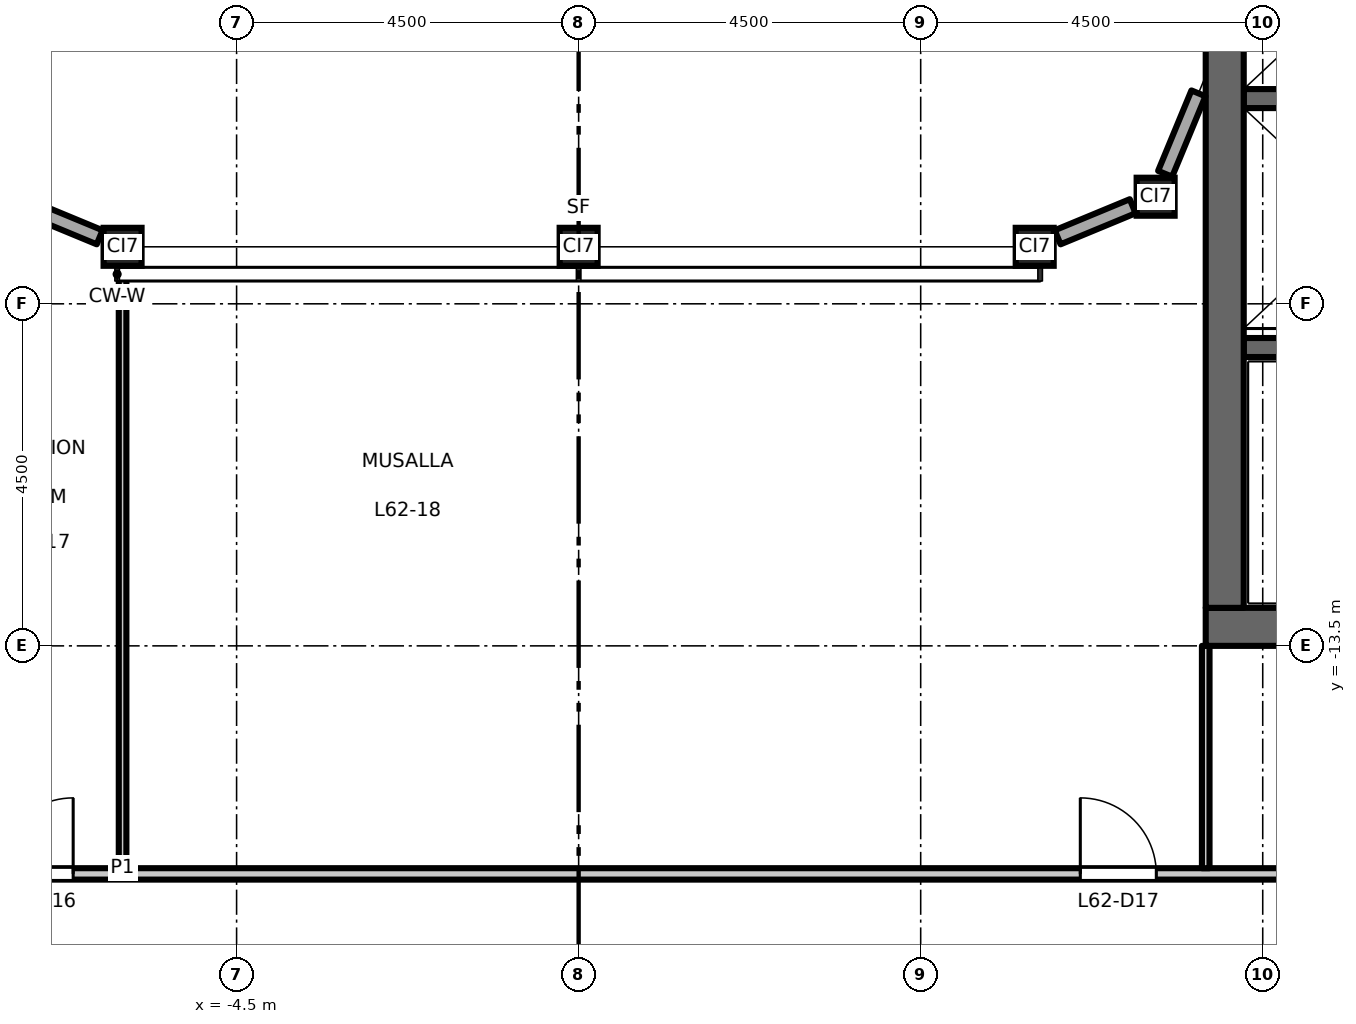
"""IFC4 building model, lengths in metres.
Left out: names, types, materials, properties, quantities, classifications, styles, units other than length and angle.
Written with IfcOpenShell. Run it as: python <this file> out.ifc"""

import sys

from ifc_helpers import new_model, si_unit, direction, frame, frame_2d, origin, origin_2d, place, context, subcontext, project, spatial, rectangle, hollow_rectangle, extrude, element, fill, save


model = new_model("IFC4")
c1 = context("Model", 3, precision=1e-05, world=origin(), true_north=direction((0.0, 1.0)))
c2 = subcontext(c1, "Body", "Model", "MODEL_VIEW")
j1 = project(units=[si_unit("LENGTHUNIT", "METRE"), si_unit("PLANEANGLEUNIT", "RADIAN")], contexts=[c1])
p1 = place(None, origin())
s1 = spatial("IfcSite", under=j1, at=p1, CompositionType="ELEMENT")
p2 = place(p1, origin())
s2 = spatial("IfcBuilding", under=s1, at=p2, CompositionType="ELEMENT")
p3 = place(p2, frame((0.0, 0.0, 289.7)))
s3 = spatial("IfcBuildingStorey", under=s2, at=p3, CompositionType="ELEMENT", Elevation=289.7)
for number, where, z_axis, x_axis in (
    (1, (-6.0, -8.25, 0.0), (0.0, 0.0, 1.0), (1.0, 0.0, 0.0)),
    (2, (0.0, -8.25, 0.0), (0.0, 0.0, 1.0), (1.0, 0.0, 0.0)),
    (3, (6.0, -8.25, 0.0), (0.0, 0.0, 1.0), (1.0, 0.0, 0.0)),
    (4, (7.591, -7.591, 0.0), (0.0, 0.0, 1.0), (1.0, 0.0, 0.0)),
):
    element("IfcColumn", number, at=place(p3, frame(where, z_axis=z_axis, x_axis=x_axis)), inside=s3, PredefinedType="COLUMN", context=c2, shape_type="SweptSolid", body=[
        extrude(hollow_rectangle(XDim=0.5, YDim=0.5, WallThickness=0.025, at=origin_2d()), origin(), (0.0, 0.0, 1.0), 4.5),
    ])
p4 = place(p3, frame((8.75, -6.3, 0.0), z_axis=(0.0, 0.0, 1.0), x_axis=(1.0, 0.0, 0.0)))
e5 = element("IfcWall", 5, at=p4, inside=s3, PredefinedType="SHEAR", context=c2, shape_type="SweptSolid", body=[
    extrude(rectangle(XDim=3.1, YDim=0.25, at=frame_2d((1.55, 0.0))), origin(), (0.0, 0.0, 1.0), 4.35),
])
p5 = place(p3, frame((8.75, -9.575, 0.0), z_axis=(0.0, 0.0, 1.0), x_axis=(1.0, 0.0, 0.0)))
e6 = element("IfcWall", 6, at=p5, inside=s3, PredefinedType="SHEAR", context=c2, shape_type="SweptSolid", body=[
    extrude(rectangle(XDim=8.0, YDim=0.25, at=frame_2d((4.0, 0.0))), origin(), (0.0, 0.0, 1.0), 4.35),
])
p6 = place(p5, frame((6.65, 0.0, 0.0)))
e7 = element("IfcOpeningElement", 7, at=p6, cuts=e6, PredefinedType="OPENING", context=c2, shape_type="SweptSolid", body=[
    extrude(rectangle(XDim=1.1, YDim=2.1, at=frame_2d((0.55, 1.05))), frame((0.0, 0.135, 0.0), z_axis=(0.0, -1.0, 0.0), x_axis=(1.0, 0.0, 0.0)), (0.0, 0.0, 1.0), 0.27),
])
p7 = place(p3, frame((8.25, -13.25, 0.0), z_axis=(0.0, 0.0, 1.0), x_axis=(1.0, 0.0, 0.0)))
e8 = element("IfcWall", 8, at=p7, inside=s3, PredefinedType="SHEAR", context=c2, shape_type="SweptSolid", body=[
    extrude(rectangle(XDim=9.0, YDim=0.5, at=frame_2d((4.5, 0.0))), origin(), (0.0, 0.0, 1.0), 4.35),
])
p8 = place(p3, frame((8.5, -13.0, 0.0), z_axis=(0.0, 0.0, 1.0), x_axis=(0.0, 1.0, 0.0)))
e9 = element("IfcWall", 9, at=p8, inside=s3, PredefinedType="SHEAR", context=c2, shape_type="SweptSolid", body=[
    extrude(rectangle(XDim=26.0, YDim=0.5, at=frame_2d((13.0, 0.0))), origin(), (0.0, 0.0, 1.0), 4.35),
])
p9 = place(p3, frame((6.302, -8.125, 0.0), z_axis=(0.0, 0.0, 1.0), x_axis=(0.923919409248, 0.382587147216, 0.0)))
e10 = element("IfcWall", 10, at=p9, inside=s3, PredefinedType="STANDARD", context=c2, shape_type="SweptSolid", body=[
    extrude(rectangle(XDim=1.069, YDim=0.2, at=frame_2d((0.534, 0.0))), origin(), (0.0, 0.0, 1.0), 4.01),
])
p10 = place(p3, frame((7.716, -7.289, 0.0), z_axis=(0.0, 0.0, 1.0), x_axis=(0.382571404949, 0.923925927829, 0.0)))
e11 = element("IfcWall", 11, at=p10, inside=s3, PredefinedType="STANDARD", context=c2, shape_type="SweptSolid", body=[
    extrude(rectangle(XDim=1.146, YDim=0.2, at=frame_2d((0.573, 0.0))), origin(), (0.0, 0.0, 1.0), 4.01),
])
p11 = place(p3, frame((-7.289, -7.716, 0.0), z_axis=(0.0, 0.0, 1.0), x_axis=(0.923919409248, -0.382587147216, 0.0)))
e12 = element("IfcWall", 12, at=p11, inside=s3, PredefinedType="STANDARD", context=c2, shape_type="SweptSolid", body=[
    extrude(rectangle(XDim=1.069, YDim=0.2, at=frame_2d((0.534, 0.0))), origin(), (0.0, 0.0, 1.0), 4.01),
])
p12 = place(p3, frame((-17.325, -16.5, 0.0), z_axis=(0.0, 0.0, 1.0), x_axis=(1.0, 0.0, 0.0)))
e13 = element("IfcWall", 13, at=p12, inside=s3, PredefinedType="PARTITIONING", context=c2, shape_type="SweptSolid", body=[
    extrude(rectangle(XDim=34.65, YDim=0.15, at=frame_2d((17.325, 0.0))), origin(), (0.0, 0.0, 1.0), 4.35),
])
p13 = place(p12, frame((9.675, 0.0, 0.0)))
e14 = element("IfcOpeningElement", 14, at=p13, cuts=e13, PredefinedType="OPENING", context=c2, shape_type="SweptSolid", body=[
    extrude(rectangle(XDim=1.0, YDim=2.1, at=frame_2d((0.5, 1.05))), frame((0.0, 0.085, 0.0), z_axis=(0.0, -1.0, 0.0), x_axis=(1.0, 0.0, 0.0)), (0.0, 0.0, 1.0), 0.17),
])
p14 = place(p12, frame((23.925, 0.0, 0.0)))
e15 = element("IfcOpeningElement", 15, at=p14, cuts=e13, PredefinedType="OPENING", context=c2, shape_type="SweptSolid", body=[
    extrude(rectangle(XDim=1.0, YDim=2.1, at=frame_2d((0.5, 1.05))), frame((0.0, 0.085, 0.0), z_axis=(0.0, -1.0, 0.0), x_axis=(1.0, 0.0, 0.0)), (0.0, 0.0, 1.0), 0.17),
])
p15 = place(p12, frame((0.675, 0.0, 0.0)))
e16 = element("IfcOpeningElement", 16, at=p15, cuts=e13, PredefinedType="OPENING", context=c2, shape_type="SweptSolid", body=[
    extrude(rectangle(XDim=1.0, YDim=2.1, at=frame_2d((0.5, 1.05))), frame((0.0, 0.085, 0.0), z_axis=(0.0, -1.0, 0.0), x_axis=(1.0, 0.0, 0.0)), (0.0, 0.0, 1.0), 0.17),
])
p16 = place(p12, frame((32.925, 0.0, 0.0)))
e17 = element("IfcOpeningElement", 17, at=p16, cuts=e13, PredefinedType="OPENING", context=c2, shape_type="SweptSolid", body=[
    extrude(rectangle(XDim=1.0, YDim=2.1, at=frame_2d((0.5, 1.05))), frame((0.0, 0.085, 0.0), z_axis=(0.0, -1.0, 0.0), x_axis=(1.0, 0.0, 0.0)), (0.0, 0.0, 1.0), 0.17),
])
p17 = place(p3, frame((-6.0, -16.425, 0.0), z_axis=(0.0, 0.0, 1.0), x_axis=(0.0, 1.0, 0.0)))
e18 = element("IfcWall", 18, at=p17, inside=s3, PredefinedType="PARTITIONING", context=c2, shape_type="SweptSolid", body=[
    extrude(rectangle(XDim=7.875, YDim=0.1, at=frame_2d((3.938, 0.0))), origin(), (0.0, 0.0, 1.0), 4.35),
])
p18 = place(p3, frame((8.25, -16.425, 0.0), z_axis=(0.0, 0.0, 1.0), x_axis=(0.0, 1.0, 0.0)))
e19 = element("IfcWall", 19, at=p18, inside=s3, PredefinedType="PARTITIONING", context=c2, shape_type="SweptSolid", body=[
    extrude(rectangle(XDim=2.925, YDim=0.1, at=frame_2d((1.462, 0.0))), origin(), (0.0, 0.0, 1.0), 4.35),
])
p19 = place(p13, origin())
e20 = element("IfcDoor", 20, at=p19, inside=s3, OperationType="SINGLE_SWING_RIGHT", PredefinedType="DOOR", context=c2, shape_type="SweptSolid", body=[
    extrude(rectangle(XDim=1.0, YDim=2.1, at=frame_2d((0.5, 1.05))), frame((0.0, 0.025, 0.0), z_axis=(0.0, -1.0, 0.0), x_axis=(1.0, 0.0, 0.0)), (0.0, 0.0, 1.0), 0.05),
])
fill(e14, e20)
p20 = place(p14, origin())
e21 = element("IfcDoor", 21, at=p20, inside=s3, OperationType="SINGLE_SWING_LEFT", PredefinedType="DOOR", context=c2, shape_type="SweptSolid", body=[
    extrude(rectangle(XDim=1.0, YDim=2.1, at=frame_2d((0.5, 1.05))), frame((0.0, 0.025, 0.0), z_axis=(0.0, -1.0, 0.0), x_axis=(1.0, 0.0, 0.0)), (0.0, 0.0, 1.0), 0.05),
])
fill(e15, e21)
save(model, sys.argv[1])
